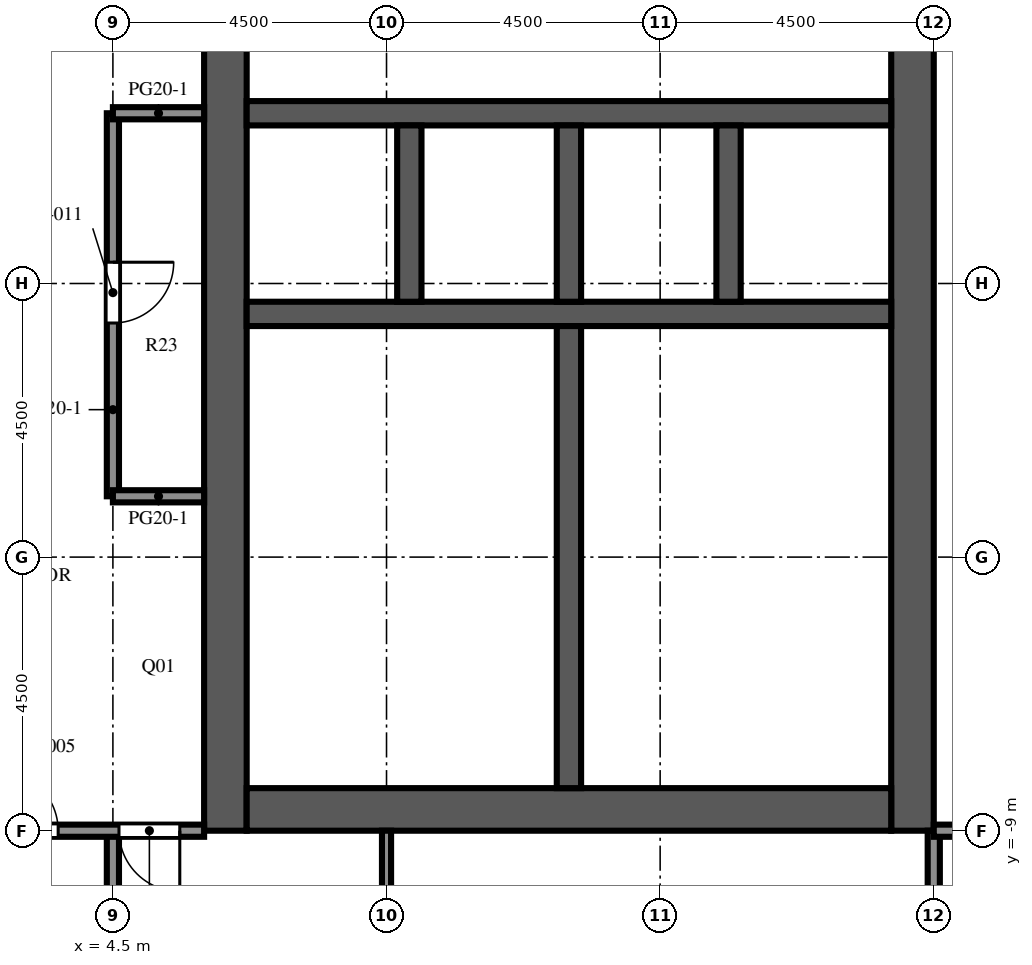
"""IFC4 building model, lengths in metres.
Left out: names, types, materials, properties, quantities, classifications, styles, units other than length and angle.
Written with IfcOpenShell. Run it as: python <this file> out.ifc"""

import sys

from ifc_helpers import new_model, si_unit, direction, frame, frame_2d, origin, place, context, subcontext, project, spatial, rectangle, extrude, element, fill, save


model = new_model("IFC4")
c1 = context("Model", 3, precision=1e-05, world=origin(), true_north=direction((0.0, 1.0)))
c2 = subcontext(c1, "Body", "Model", "MODEL_VIEW")
j1 = project(units=[si_unit("LENGTHUNIT", "METRE"), si_unit("PLANEANGLEUNIT", "RADIAN")], contexts=[c1])
p1 = place(None, origin())
s1 = spatial("IfcSite", under=j1, at=p1, CompositionType="ELEMENT")
p2 = place(p1, origin())
s2 = spatial("IfcBuilding", under=s1, at=p2, CompositionType="ELEMENT")
p3 = place(p2, frame((0.0, 0.0, 266.3)))
s3 = spatial("IfcBuildingStorey", under=s2, at=p3, CompositionType="ELEMENT", Elevation=266.3)
p4 = place(p3, frame((6.35, -9.0, 0.0), z_axis=(0.0, 0.0, 1.0), x_axis=(0.0, 1.0, 0.0)))
e1 = element("IfcWall", 1, at=p4, inside=s3, PredefinedType="SHEAR", context=c2, shape_type="SweptSolid", body=[
    extrude(rectangle(XDim=27.5, YDim=0.7, at=frame_2d((13.75, 0.0))), origin(), (0.0, 0.0, 1.0), 4.1),
])
p5 = place(p4, frame((12.55, 0.0, 0.0)))
e2 = element("IfcOpeningElement", 2, at=p5, cuts=e1, PredefinedType="OPENING", context=c2, shape_type="SweptSolid", body=[
    extrude(rectangle(XDim=2.4, YDim=2.4, at=frame_2d((1.2, 1.2))), frame((0.0, 0.36, 0.0), z_axis=(0.0, -1.0, 0.0), x_axis=(1.0, 0.0, 0.0)), (0.0, 0.0, 1.0), 0.72),
])
p6 = place(p4, frame((3.788, 0.0, 0.0)))
e3 = element("IfcOpeningElement", 3, at=p6, cuts=e1, PredefinedType="OPENING", context=c2, shape_type="SweptSolid", body=[
    extrude(rectangle(XDim=0.968, YDim=2.1, at=frame_2d((0.484, 1.05))), frame((0.0, 0.36, 0.0), z_axis=(0.0, -1.0, 0.0), x_axis=(1.0, 0.0, 0.0)), (0.0, 0.0, 1.0), 0.72),
])
p7 = place(p4, frame((23.54, 0.0, 0.0)))
e4 = element("IfcOpeningElement", 4, at=p7, cuts=e1, PredefinedType="OPENING", context=c2, shape_type="SweptSolid", body=[
    extrude(rectangle(XDim=1.2, YDim=2.1, at=frame_2d((0.6, 1.05))), frame((0.0, 0.36, 0.0), z_axis=(0.0, -1.0, 0.0), x_axis=(1.0, 0.0, 0.0)), (0.0, 0.0, 1.0), 0.72),
])
p8 = place(p3, frame((17.65, -9.0, 0.0), z_axis=(0.0, 0.0, 1.0), x_axis=(0.0, 1.0, 0.0)))
e5 = element("IfcWall", 5, at=p8, inside=s3, PredefinedType="SHEAR", context=c2, shape_type="SweptSolid", body=[
    extrude(rectangle(XDim=27.5, YDim=0.7, at=frame_2d((13.75, 0.0))), origin(), (0.0, 0.0, 1.0), 4.1),
])
p9 = place(p8, frame((12.55, 0.0, 0.0)))
e6 = element("IfcOpeningElement", 6, at=p9, cuts=e5, PredefinedType="OPENING", context=c2, shape_type="SweptSolid", body=[
    extrude(rectangle(XDim=2.4, YDim=2.4, at=frame_2d((1.2, 1.2))), frame((0.0, 0.36, 0.0), z_axis=(0.0, -1.0, 0.0), x_axis=(1.0, 0.0, 0.0)), (0.0, 0.0, 1.0), 0.72),
])
p10 = place(p8, frame((6.825, 0.0, 0.0)))
e7 = element("IfcOpeningElement", 7, at=p10, cuts=e5, PredefinedType="OPENING", context=c2, shape_type="SweptSolid", body=[
    extrude(rectangle(XDim=1.2, YDim=2.1, at=frame_2d((0.6, 1.05))), frame((0.0, 0.36, 0.0), z_axis=(0.0, -1.0, 0.0), x_axis=(1.0, 0.0, 0.0)), (0.0, 0.0, 1.0), 0.72),
])
p11 = place(p8, frame((19.475, 0.0, 0.0)))
e8 = element("IfcOpeningElement", 8, at=p11, cuts=e5, PredefinedType="OPENING", context=c2, shape_type="SweptSolid", body=[
    extrude(rectangle(XDim=1.2, YDim=2.1, at=frame_2d((0.6, 1.05))), frame((0.0, 0.36, 0.0), z_axis=(0.0, -1.0, 0.0), x_axis=(1.0, 0.0, 0.0)), (0.0, 0.0, 1.0), 0.72),
])
p12 = place(p3, frame((6.7, -8.65, 0.0), z_axis=(0.0, 0.0, 1.0), x_axis=(1.0, 0.0, 0.0)))
e9 = element("IfcWall", 9, at=p12, inside=s3, PredefinedType="SHEAR", context=c2, shape_type="SweptSolid", body=[
    extrude(rectangle(XDim=10.6, YDim=0.7, at=frame_2d((5.3, 0.0))), origin(), (0.0, 0.0, 1.0), 4.1),
])
p13 = place(p3, frame((6.7, -0.5, 0.0), z_axis=(0.0, 0.0, 1.0), x_axis=(1.0, 0.0, 0.0)))
e10 = element("IfcWall", 10, at=p13, inside=s3, PredefinedType="SHEAR", context=c2, shape_type="SweptSolid", body=[
    extrude(rectangle(XDim=10.6, YDim=0.4, at=frame_2d((5.3, 0.0))), origin(), (0.0, 0.0, 1.0), 4.1),
])
p14 = place(p3, frame((6.7, 2.8, 0.0), z_axis=(0.0, 0.0, 1.0), x_axis=(1.0, 0.0, 0.0)))
e11 = element("IfcWall", 11, at=p14, inside=s3, PredefinedType="SHEAR", context=c2, shape_type="SweptSolid", body=[
    extrude(rectangle(XDim=10.6, YDim=0.4, at=frame_2d((5.3, 0.0))), origin(), (0.0, 0.0, 1.0), 4.1),
])
p15 = place(p14, frame((0.688, 0.0, 0.0)))
e12 = element("IfcOpeningElement", 12, at=p15, cuts=e11, PredefinedType="OPENING", context=c2, shape_type="SweptSolid", body=[
    extrude(rectangle(XDim=1.1, YDim=2.1, at=frame_2d((0.55, 1.05))), frame((0.0, 0.21, 0.0), z_axis=(0.0, -1.0, 0.0), x_axis=(1.0, 0.0, 0.0)), (0.0, 0.0, 1.0), 0.42),
])
p16 = place(p14, frame((3.438, 0.0, 0.0)))
e13 = element("IfcOpeningElement", 13, at=p16, cuts=e11, PredefinedType="OPENING", context=c2, shape_type="SweptSolid", body=[
    extrude(rectangle(XDim=1.1, YDim=2.1, at=frame_2d((0.55, 1.05))), frame((0.0, 0.21, 0.0), z_axis=(0.0, -1.0, 0.0), x_axis=(1.0, 0.0, 0.0)), (0.0, 0.0, 1.0), 0.42),
])
p17 = place(p14, frame((6.113, 0.0, 0.0)))
e14 = element("IfcOpeningElement", 14, at=p17, cuts=e11, PredefinedType="OPENING", context=c2, shape_type="SweptSolid", body=[
    extrude(rectangle(XDim=1.0, YDim=2.1, at=frame_2d((0.5, 1.05))), frame((0.0, 0.21, 0.0), z_axis=(0.0, -1.0, 0.0), x_axis=(1.0, 0.0, 0.0)), (0.0, 0.0, 1.0), 0.42),
])
p18 = place(p14, frame((8.863, 0.0, 0.0)))
e15 = element("IfcOpeningElement", 15, at=p18, cuts=e11, PredefinedType="OPENING", context=c2, shape_type="SweptSolid", body=[
    extrude(rectangle(XDim=1.0, YDim=2.1, at=frame_2d((0.5, 1.05))), frame((0.0, 0.21, 0.0), z_axis=(0.0, -1.0, 0.0), x_axis=(1.0, 0.0, 0.0)), (0.0, 0.0, 1.0), 0.42),
])
for number, where, z_axis, x_axis in (
    (16, (9.375, -0.3, 0.0), (0.0, 0.0, 1.0), (0.0, 1.0, 0.0)),
    (17, (12.0, -0.3, 0.0), (0.0, 0.0, 1.0), (0.0, 1.0, 0.0)),
    (18, (14.625, -0.3, 0.0), (0.0, 0.0, 1.0), (0.0, 1.0, 0.0)),
):
    element("IfcWall", number, at=place(p3, frame(where, z_axis=z_axis, x_axis=x_axis)), inside=s3, PredefinedType="SHEAR", context=c2, shape_type="SweptSolid", body=[
        extrude(rectangle(XDim=2.9, YDim=0.4, at=frame_2d((1.45, 0.0))), origin(), (0.0, 0.0, 1.0), 4.1),
    ])
p19 = place(p3, frame((12.0, -8.3, 0.0), z_axis=(0.0, 0.0, 1.0), x_axis=(0.0, 1.0, 0.0)))
e19 = element("IfcWall", 19, at=p19, inside=s3, PredefinedType="SHEAR", context=c2, shape_type="SweptSolid", body=[
    extrude(rectangle(XDim=7.6, YDim=0.4, at=frame_2d((3.8, 0.0))), origin(), (0.0, 0.0, 1.0), 4.1),
])
p20 = place(p3, frame((6.7, -5.412, 0.0), z_axis=(0.0, 0.0, 1.0), x_axis=(1.0, 0.0, 0.0)))
e20 = element("IfcWall", 20, at=p20, inside=s3, PredefinedType="PARTITIONING", context=c2, shape_type="SweptSolid", body=[
    extrude(rectangle(XDim=5.1, YDim=0.1, at=frame_2d((2.55, 0.0))), origin(), (0.0, 0.0, 1.0), 3.65),
])
p21 = place(p20, frame((2.05, 0.0, 0.0)))
e21 = element("IfcOpeningElement", 21, at=p21, cuts=e20, PredefinedType="OPENING", context=c2, shape_type="SweptSolid", body=[
    extrude(rectangle(XDim=1.0, YDim=2.1, at=frame_2d((0.5, 1.05))), frame((0.0, 0.06, 0.0), z_axis=(0.0, -1.0, 0.0), x_axis=(1.0, 0.0, 0.0)), (0.0, 0.0, 1.0), 0.12),
])
p22 = place(p3, frame((6.7, -4.044, 0.0), z_axis=(0.0, 0.0, 1.0), x_axis=(1.0, 0.0, 0.0)))
e22 = element("IfcWall", 22, at=p22, inside=s3, PredefinedType="PARTITIONING", context=c2, shape_type="SweptSolid", body=[
    extrude(rectangle(XDim=3.162, YDim=0.1, at=frame_2d((1.581, 0.0))), origin(), (0.0, 0.0, 1.0), 3.65),
])
p23 = place(p22, frame((1.081, 0.0, 0.0)))
e23 = element("IfcOpeningElement", 23, at=p23, cuts=e22, PredefinedType="OPENING", context=c2, shape_type="SweptSolid", body=[
    extrude(rectangle(XDim=1.0, YDim=2.1, at=frame_2d((0.5, 1.05))), frame((0.0, 0.06, 0.0), z_axis=(0.0, -1.0, 0.0), x_axis=(1.0, 0.0, 0.0)), (0.0, 0.0, 1.0), 0.12),
])
p24 = place(p3, frame((9.862, -4.044, 0.0), z_axis=(0.0, 0.0, 1.0), x_axis=(1.0, 0.0, 0.0)))
e24 = element("IfcWall", 24, at=p24, inside=s3, PredefinedType="PARTITIONING", context=c2, shape_type="SweptSolid", body=[
    extrude(rectangle(XDim=1.938, YDim=0.1, at=frame_2d((0.969, 0.0))), origin(), (0.0, 0.0, 1.0), 3.65),
])
p25 = place(p24, frame((0.469, 0.0, 0.0)))
e25 = element("IfcOpeningElement", 25, at=p25, cuts=e24, PredefinedType="OPENING", context=c2, shape_type="SweptSolid", body=[
    extrude(rectangle(XDim=1.0, YDim=2.1, at=frame_2d((0.5, 1.05))), frame((0.0, 0.06, 0.0), z_axis=(0.0, -1.0, 0.0), x_axis=(1.0, 0.0, 0.0)), (0.0, 0.0, 1.0), 0.12),
])
p26 = place(p3, frame((9.862, -4.044, 0.0), z_axis=(0.0, 0.0, 1.0), x_axis=(0.0, 1.0, 0.0)))
e26 = element("IfcWall", 26, at=p26, inside=s3, PredefinedType="PARTITIONING", context=c2, shape_type="SweptSolid", body=[
    extrude(rectangle(XDim=3.344, YDim=0.1, at=frame_2d((1.672, 0.0))), origin(), (0.0, 0.0, 1.0), 3.65),
])
p27 = place(p3, frame((4.5, -17.6, 0.0), z_axis=(0.0, 0.0, 1.0), x_axis=(0.0, 1.0, 0.0)))
e27 = element("IfcWall", 27, at=p27, inside=s3, PredefinedType="PARTITIONING", context=c2, shape_type="SweptSolid", body=[
    extrude(rectangle(XDim=8.6, YDim=0.2, at=frame_2d((4.3, 0.0))), origin(), (0.0, 0.0, 1.0), 3.65),
])
p28 = place(p3, frame((4.5, 2.8, 0.0), z_axis=(0.0, 0.0, 1.0), x_axis=(0.0, -1.0, 0.0)))
e28 = element("IfcWall", 28, at=p28, inside=s3, PredefinedType="PARTITIONING", context=c2, shape_type="SweptSolid", body=[
    extrude(rectangle(XDim=6.3, YDim=0.2, at=frame_2d((3.15, 0.0))), origin(), (0.0, 0.0, 1.0), 3.65),
])
p29 = place(p28, frame((2.45, 0.0, 0.0)))
e29 = element("IfcOpeningElement", 29, at=p29, cuts=e28, PredefinedType="OPENING", context=c2, shape_type="SweptSolid", body=[
    extrude(rectangle(XDim=1.0, YDim=2.1, at=frame_2d((0.5, 1.05))), frame((0.0, 0.11, 0.0), z_axis=(0.0, -1.0, 0.0), x_axis=(1.0, 0.0, 0.0)), (0.0, 0.0, 1.0), 0.22),
])
p30 = place(p3, frame((9.0, -9.0, 0.0), z_axis=(0.0, 0.0, 1.0), x_axis=(0.0, -1.0, 0.0)))
e30 = element("IfcWall", 30, at=p30, inside=s3, PredefinedType="PARTITIONING", context=c2, shape_type="SweptSolid", body=[
    extrude(rectangle(XDim=8.6, YDim=0.15, at=frame_2d((4.3, 0.0))), origin(), (0.0, 0.0, 1.0), 3.65),
])
p31 = place(p30, frame((4.9, 0.0, 0.0)))
e31 = element("IfcOpeningElement", 31, at=p31, cuts=e30, PredefinedType="OPENING", context=c2, shape_type="SweptSolid", body=[
    extrude(rectangle(XDim=1.0, YDim=2.1, at=frame_2d((0.5, 1.05))), frame((0.0, 0.085, 0.0), z_axis=(0.0, -1.0, 0.0), x_axis=(1.0, 0.0, 0.0)), (0.0, 0.0, 1.0), 0.17),
])
p32 = place(p3, frame((18.0, -17.577, 0.0), z_axis=(0.0, 0.0, 1.0), x_axis=(0.0, 1.0, 0.0)))
e32 = element("IfcWall", 32, at=p32, inside=s3, PredefinedType="PARTITIONING", context=c2, shape_type="SweptSolid", body=[
    extrude(rectangle(XDim=8.577, YDim=0.2, at=frame_2d((4.289, 0.0))), origin(), (0.0, 0.0, 1.0), 3.65),
])
p33 = place(p3, frame((6.0, -9.0, 0.0), z_axis=(0.0, 0.0, 1.0), x_axis=(-1.0, 0.0, 0.0)))
e33 = element("IfcWall", 33, at=p33, inside=s3, PredefinedType="PARTITIONING", context=c2, shape_type="SweptSolid", body=[
    extrude(rectangle(XDim=4.5, YDim=0.2, at=frame_2d((2.25, 0.0))), origin(), (0.0, 0.0, 1.0), 3.65),
])
p34 = place(p33, frame((2.4, 0.0, 0.0)))
e34 = element("IfcOpeningElement", 34, at=p34, cuts=e33, PredefinedType="OPENING", context=c2, shape_type="SweptSolid", body=[
    extrude(rectangle(XDim=1.0, YDim=2.1, at=frame_2d((0.5, 1.05))), frame((0.0, 0.11, 0.0), z_axis=(0.0, -1.0, 0.0), x_axis=(1.0, 0.0, 0.0)), (0.0, 0.0, 1.0), 0.22),
])
p35 = place(p33, frame((0.4, 0.0, 0.0)))
e35 = element("IfcOpeningElement", 35, at=p35, cuts=e33, PredefinedType="OPENING", context=c2, shape_type="SweptSolid", body=[
    extrude(rectangle(XDim=1.0, YDim=2.1, at=frame_2d((0.5, 1.05))), frame((0.0, 0.11, 0.0), z_axis=(0.0, -1.0, 0.0), x_axis=(1.0, 0.0, 0.0)), (0.0, 0.0, 1.0), 0.22),
])
p36 = place(p3, frame((22.1, -9.0, 0.0), z_axis=(0.0, 0.0, 1.0), x_axis=(-1.0, 0.0, 0.0)))
e36 = element("IfcWall", 36, at=p36, inside=s3, PredefinedType="PARTITIONING", context=c2, shape_type="SweptSolid", body=[
    extrude(rectangle(XDim=4.1, YDim=0.2, at=frame_2d((2.05, 0.0))), origin(), (0.0, 0.0, 1.0), 3.65),
])
p37 = place(p36, frame((1.0, 0.0, 0.0)))
e37 = element("IfcOpeningElement", 37, at=p37, cuts=e36, PredefinedType="OPENING", context=c2, shape_type="SweptSolid", body=[
    extrude(rectangle(XDim=1.0, YDim=2.1, at=frame_2d((0.5, 1.05))), frame((0.0, 0.11, 0.0), z_axis=(0.0, -1.0, 0.0), x_axis=(1.0, 0.0, 0.0)), (0.0, 0.0, 1.0), 0.22),
])
for number, where, z_axis, x_axis in (
    (38, (4.5, -3.5, 0.0), (0.0, 0.0, 1.0), (1.0, 0.0, 0.0)),
    (39, (4.5, 2.8, 0.0), (0.0, 0.0, 1.0), (1.0, 0.0, 0.0)),
):
    element("IfcWall", number, at=place(p3, frame(where, z_axis=z_axis, x_axis=x_axis)), inside=s3, PredefinedType="PARTITIONING", context=c2, shape_type="SweptSolid", body=[
        extrude(rectangle(XDim=1.5, YDim=0.2, at=frame_2d((0.75, 0.0))), origin(), (0.0, 0.0, 1.0), 3.65),
    ])
p38 = place(p15, origin())
e40 = element("IfcDoor", 40, at=p38, inside=s3, OperationType="DOUBLE_DOOR_SLIDING", PredefinedType="DOOR", context=c2, shape_type="SweptSolid", body=[
    extrude(rectangle(XDim=1.1, YDim=2.1, at=frame_2d((0.55, 1.05))), frame((0.0, 0.025, 0.0), z_axis=(0.0, -1.0, 0.0), x_axis=(1.0, 0.0, 0.0)), (0.0, 0.0, 1.0), 0.05),
])
fill(e12, e40)
p39 = place(p16, origin())
e41 = element("IfcDoor", 41, at=p39, inside=s3, OperationType="DOUBLE_DOOR_SLIDING", PredefinedType="DOOR", context=c2, shape_type="SweptSolid", body=[
    extrude(rectangle(XDim=1.1, YDim=2.1, at=frame_2d((0.55, 1.05))), frame((0.0, 0.025, 0.0), z_axis=(0.0, -1.0, 0.0), x_axis=(1.0, 0.0, 0.0)), (0.0, 0.0, 1.0), 0.05),
])
fill(e13, e41)
p40 = place(p5, origin())
e42 = element("IfcDoor", 42, at=p40, inside=s3, OperationType="DOUBLE_DOOR_DOUBLE_SWING", PredefinedType="DOOR", context=c2, shape_type="SweptSolid", body=[
    extrude(rectangle(XDim=2.4, YDim=2.4, at=frame_2d((1.2, 1.2))), frame((0.0, 0.025, 0.0), z_axis=(0.0, -1.0, 0.0), x_axis=(1.0, 0.0, 0.0)), (0.0, 0.0, 1.0), 0.05),
])
fill(e2, e42)
p41 = place(p9, origin())
e43 = element("IfcDoor", 43, at=p41, inside=s3, OperationType="DOUBLE_DOOR_DOUBLE_SWING", PredefinedType="DOOR", context=c2, shape_type="SweptSolid", body=[
    extrude(rectangle(XDim=2.4, YDim=2.4, at=frame_2d((1.2, 1.2))), frame((0.0, 0.025, 0.0), z_axis=(0.0, -1.0, 0.0), x_axis=(1.0, 0.0, 0.0)), (0.0, 0.0, 1.0), 0.05),
])
fill(e6, e43)
p42 = place(p10, frame((1.2, 0.0, 0.0), z_axis=(0.0, 0.0, 1.0), x_axis=(-1.0, 0.0, 0.0)))
e44 = element("IfcDoor", 44, at=p42, inside=s3, OperationType="SINGLE_SWING_LEFT", PredefinedType="DOOR", context=c2, shape_type="SweptSolid", body=[
    extrude(rectangle(XDim=1.2, YDim=2.1, at=frame_2d((0.6, 1.05))), frame((0.0, 0.025, 0.0), z_axis=(0.0, -1.0, 0.0), x_axis=(1.0, 0.0, 0.0)), (0.0, 0.0, 1.0), 0.05),
])
fill(e7, e44)
p43 = place(p17, origin())
e45 = element("IfcDoor", 45, at=p43, inside=s3, OperationType="SINGLE_SWING_LEFT", PredefinedType="DOOR", context=c2, shape_type="SweptSolid", body=[
    extrude(rectangle(XDim=1.0, YDim=2.1, at=frame_2d((0.5, 1.05))), frame((0.0, 0.025, 0.0), z_axis=(0.0, -1.0, 0.0), x_axis=(1.0, 0.0, 0.0)), (0.0, 0.0, 1.0), 0.05),
])
fill(e14, e45)
p44 = place(p18, origin())
e46 = element("IfcDoor", 46, at=p44, inside=s3, OperationType="SINGLE_SWING_RIGHT", PredefinedType="DOOR", context=c2, shape_type="SweptSolid", body=[
    extrude(rectangle(XDim=1.0, YDim=2.1, at=frame_2d((0.5, 1.05))), frame((0.0, 0.025, 0.0), z_axis=(0.0, -1.0, 0.0), x_axis=(1.0, 0.0, 0.0)), (0.0, 0.0, 1.0), 0.05),
])
fill(e15, e46)
p45 = place(p6, origin())
e47 = element("IfcDoor", 47, at=p45, inside=s3, OperationType="SINGLE_SWING_RIGHT", PredefinedType="DOOR", context=c2, shape_type="SweptSolid", body=[
    extrude(rectangle(XDim=0.968, YDim=2.1, at=frame_2d((0.484, 1.05))), frame((0.0, -0.275, 0.0), z_axis=(0.0, -1.0, 0.0), x_axis=(1.0, 0.0, 0.0)), (0.0, 0.0, 1.0), 0.05),
])
fill(e3, e47)
p46 = place(p21, origin())
e48 = element("IfcDoor", 48, at=p46, inside=s3, OperationType="SINGLE_SWING_LEFT", PredefinedType="DOOR", context=c2, shape_type="SweptSolid", body=[
    extrude(rectangle(XDim=1.0, YDim=2.1, at=frame_2d((0.5, 1.05))), frame((0.0, 0.025, 0.0), z_axis=(0.0, -1.0, 0.0), x_axis=(1.0, 0.0, 0.0)), (0.0, 0.0, 1.0), 0.05),
])
fill(e21, e48)
p47 = place(p23, origin())
e49 = element("IfcDoor", 49, at=p47, inside=s3, OperationType="SINGLE_SWING_RIGHT", PredefinedType="DOOR", context=c2, shape_type="SweptSolid", body=[
    extrude(rectangle(XDim=1.0, YDim=2.1, at=frame_2d((0.5, 1.05))), frame((0.0, 0.025, 0.0), z_axis=(0.0, -1.0, 0.0), x_axis=(1.0, 0.0, 0.0)), (0.0, 0.0, 1.0), 0.05),
])
fill(e23, e49)
p48 = place(p25, origin())
e50 = element("IfcDoor", 50, at=p48, inside=s3, OperationType="SINGLE_SWING_LEFT", PredefinedType="DOOR", context=c2, shape_type="SweptSolid", body=[
    extrude(rectangle(XDim=1.0, YDim=2.1, at=frame_2d((0.5, 1.05))), frame((0.0, 0.025, 0.0), z_axis=(0.0, -1.0, 0.0), x_axis=(1.0, 0.0, 0.0)), (0.0, 0.0, 1.0), 0.05),
])
fill(e25, e50)
p49 = place(p34, origin())
e51 = element("IfcDoor", 51, at=p49, inside=s3, OperationType="SINGLE_SWING_RIGHT", PredefinedType="DOOR", context=c2, shape_type="SweptSolid", body=[
    extrude(rectangle(XDim=1.0, YDim=2.1, at=frame_2d((0.5, 1.05))), frame((0.0, 0.025, 0.0), z_axis=(0.0, -1.0, 0.0), x_axis=(1.0, 0.0, 0.0)), (0.0, 0.0, 1.0), 0.05),
])
fill(e34, e51)
p50 = place(p35, origin())
e52 = element("IfcDoor", 52, at=p50, inside=s3, OperationType="SINGLE_SWING_LEFT", PredefinedType="DOOR", context=c2, shape_type="SweptSolid", body=[
    extrude(rectangle(XDim=1.0, YDim=2.1, at=frame_2d((0.5, 1.05))), frame((0.0, 0.025, 0.0), z_axis=(0.0, -1.0, 0.0), x_axis=(1.0, 0.0, 0.0)), (0.0, 0.0, 1.0), 0.05),
])
fill(e35, e52)
p51 = place(p29, origin())
e53 = element("IfcDoor", 53, at=p51, inside=s3, OperationType="SINGLE_SWING_LEFT", PredefinedType="DOOR", context=c2, shape_type="SweptSolid", body=[
    extrude(rectangle(XDim=1.0, YDim=2.1, at=frame_2d((0.5, 1.05))), frame((0.0, 0.025, 0.0), z_axis=(0.0, -1.0, 0.0), x_axis=(1.0, 0.0, 0.0)), (0.0, 0.0, 1.0), 0.05),
])
fill(e29, e53)
save(model, sys.argv[1])
